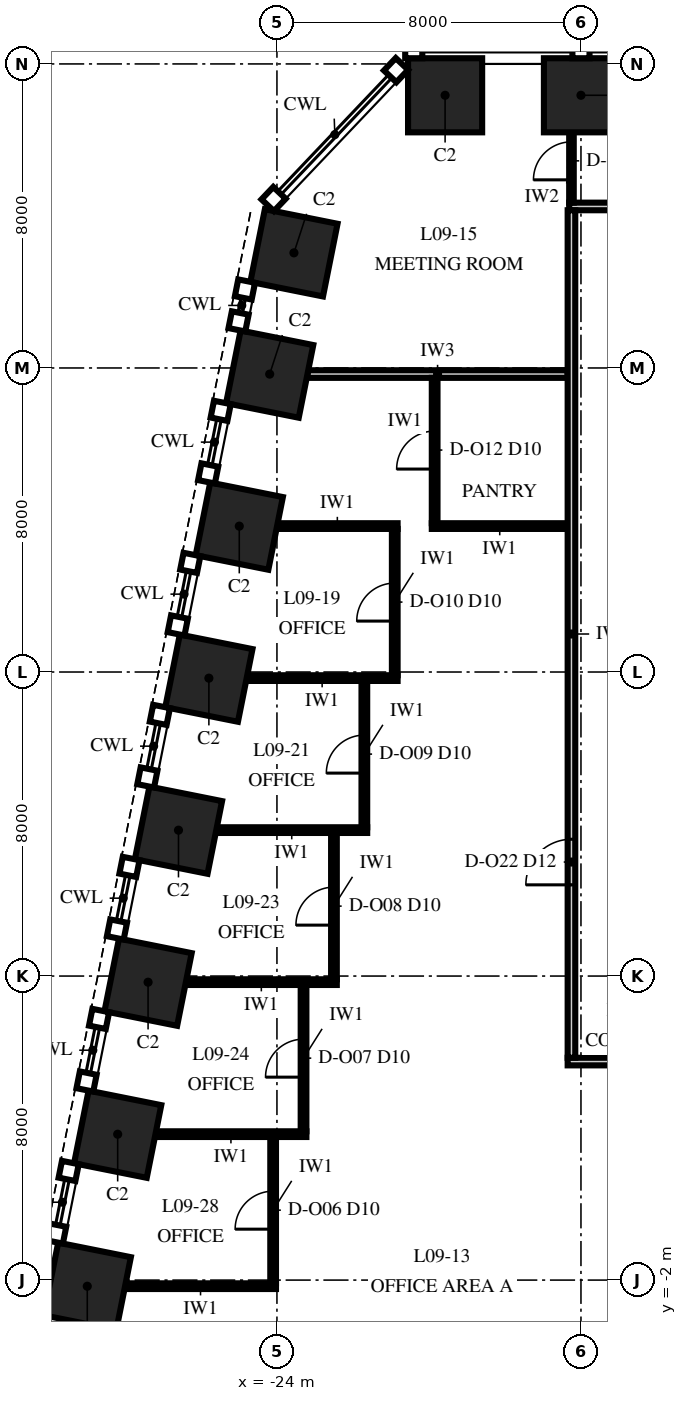
"""IFC4 building model, lengths in metres.
Left out: names, types, materials, properties, quantities, classifications, styles, units other than length and angle.
Written with IfcOpenShell. Run it as: python <this file> out.ifc"""

import sys

from ifc_helpers import new_model, si_unit, direction, frame, frame_2d, origin, origin_2d, place, context, subcontext, project, spatial, rectangle, extrude, element, fill, save


model = new_model("IFC4")
c1 = context("Model", 3, precision=1e-05, world=origin(), true_north=direction((0.0, 1.0)))
c2 = subcontext(c1, "Body", "Model", "MODEL_VIEW")
j1 = project(units=[si_unit("LENGTHUNIT", "METRE"), si_unit("PLANEANGLEUNIT", "RADIAN")], contexts=[c1])
p1 = place(None, origin())
s1 = spatial("IfcSite", under=j1, at=p1, CompositionType="ELEMENT")
p2 = place(p1, origin())
s2 = spatial("IfcBuilding", under=s1, at=p2, CompositionType="ELEMENT")
p3 = place(p2, frame((0.0, 0.0, 48.0)))
s3 = spatial("IfcBuildingStorey", under=s2, at=p3, CompositionType="ELEMENT", Elevation=48.0)
for number, where, z_axis, x_axis in (
    (1, (-16.0, 29.175, 0.0), (0.0, 0.0, 1.0), (-1.0, 0.0, 0.0)),
    (2, (-19.575, 29.175, 0.0), (0.0, 0.0, 1.0), (-1.0, 0.0, 0.0)),
    (3, (-23.553, 25.029, 0.0), (0.0, 0.0, 1.0), (-0.196, -0.981, 0.0)),
    (4, (-24.191, 21.838, 0.0), (0.0, 0.0, 1.0), (-0.196, -0.981, 0.0)),
    (5, (-24.991, 17.838, 0.0), (0.0, 0.0, 1.0), (-0.196, -0.981, 0.0)),
    (6, (-25.791, 13.838, 0.0), (0.0, 0.0, 1.0), (-0.196, -0.981, 0.0)),
    (7, (-26.591, 9.838, 0.0), (0.0, 0.0, 1.0), (-0.196, -0.981, 0.0)),
    (8, (-27.391, 5.838, 0.0), (0.0, 0.0, 1.0), (-0.196, -0.981, 0.0)),
    (9, (-28.191, 1.838, 0.0), (0.0, 0.0, 1.0), (-0.196, -0.981, 0.0)),
    (10, (-28.991, -2.162, 0.0), (0.0, 0.0, 1.0), (-0.196, -0.981, 0.0)),
):
    element("IfcColumn", number, at=place(p3, frame(where, z_axis=z_axis, x_axis=x_axis)), inside=s3, PredefinedType="COLUMN", context=c2, shape_type="SweptSolid", body=[
        extrude(rectangle(XDim=1.95, YDim=1.95, at=origin_2d()), origin(), (0.0, 0.0, 1.0), 4.0),
    ])
p4 = place(p3, frame((-27.996, -2.16, 0.0), z_axis=(0.0, 0.0, 1.0), x_axis=(1.0, 0.0, 0.0)))
e11 = element("IfcWall", 11, at=p4, inside=s3, PredefinedType="PARTITIONING", context=c2, shape_type="SweptSolid", body=[
    extrude(rectangle(XDim=3.971, YDim=0.15, at=frame_2d((1.986, 0.0))), origin(), (0.0, 0.0, 1.0), 3.25),
])
p5 = place(p3, frame((-27.196, 1.84, 0.0), z_axis=(0.0, 0.0, 1.0), x_axis=(1.0, 0.0, 0.0)))
e12 = element("IfcWall", 12, at=p5, inside=s3, PredefinedType="PARTITIONING", context=c2, shape_type="SweptSolid", body=[
    extrude(rectangle(XDim=3.971, YDim=0.15, at=frame_2d((1.986, 0.0))), origin(), (0.0, 0.0, 1.0), 3.25),
])
p6 = place(p3, frame((-16.35, 3.75, 0.0), z_axis=(0.0, 0.0, 1.0), x_axis=(1.0, 0.0, 0.0)))
e13 = element("IfcWall", 13, at=p6, inside=s3, PredefinedType="PARTITIONING", context=c2, shape_type="SweptSolid", body=[
    extrude(rectangle(XDim=32.7, YDim=0.2, at=frame_2d((16.35, 0.0))), origin(), (0.0, 0.0, 1.0), 3.25),
])
p7 = place(p6, frame((15.75, 0.0, 0.0)))
e14 = element("IfcOpeningElement", 14, at=p7, cuts=e13, PredefinedType="OPENING", context=c2, shape_type="SweptSolid", body=[
    extrude(rectangle(XDim=1.2, YDim=2.4, at=frame_2d((0.6, 1.2))), frame((0.0, 0.115, 0.0), z_axis=(0.0, -1.0, 0.0), x_axis=(1.0, 0.0, 0.0)), (0.0, 0.0, 1.0), 0.23),
])
p8 = place(p3, frame((-26.396, 5.84, 0.0), z_axis=(0.0, 0.0, 1.0), x_axis=(1.0, 0.0, 0.0)))
e15 = element("IfcWall", 15, at=p8, inside=s3, PredefinedType="PARTITIONING", context=c2, shape_type="SweptSolid", body=[
    extrude(rectangle(XDim=3.971, YDim=0.15, at=frame_2d((1.986, 0.0))), origin(), (0.0, 0.0, 1.0), 2.842),
])
for number, where, z_axis, x_axis in (
    (16, (-25.596, 9.84, 0.0), (0.0, 0.0, 1.0), (1.0, 0.0, 0.0)),
    (17, (-24.796, 13.84, 0.0), (0.0, 0.0, 1.0), (1.0, 0.0, 0.0)),
):
    element("IfcWall", number, at=place(p3, frame(where, z_axis=z_axis, x_axis=x_axis)), inside=s3, PredefinedType="PARTITIONING", context=c2, shape_type="SweptSolid", body=[
        extrude(rectangle(XDim=3.971, YDim=0.15, at=frame_2d((1.986, 0.0))), origin(), (0.0, 0.0, 1.0), 3.25),
    ])
p9 = place(p3, frame((-23.996, 17.84, 0.0), z_axis=(0.0, 0.0, 1.0), x_axis=(1.0, 0.0, 0.0)))
e18 = element("IfcWall", 18, at=p9, inside=s3, PredefinedType="PARTITIONING", context=c2, shape_type="SweptSolid", body=[
    extrude(rectangle(XDim=3.171, YDim=0.15, at=frame_2d((1.586, 0.0))), origin(), (0.0, 0.0, 1.0), 3.25),
])
p10 = place(p3, frame((-19.925, 17.84, 0.0), z_axis=(0.0, 0.0, 1.0), x_axis=(1.0, 0.0, 0.0)))
e19 = element("IfcWall", 19, at=p10, inside=s3, PredefinedType="PARTITIONING", context=c2, shape_type="SweptSolid", body=[
    extrude(rectangle(XDim=3.575, YDim=0.15, at=frame_2d((1.788, 0.0))), origin(), (0.0, 0.0, 1.0), 3.25),
])
p11 = place(p3, frame((-23.196, 21.84, 0.0), z_axis=(0.0, 0.0, 1.0), x_axis=(1.0, 0.0, 0.0)))
e20 = element("IfcWall", 20, at=p11, inside=s3, PredefinedType="PARTITIONING", context=c2, shape_type="SweptSolid", body=[
    extrude(rectangle(XDim=6.846, YDim=0.2, at=frame_2d((3.423, 0.0))), origin(), (0.0, 0.0, 1.0), 3.25),
])
p12 = place(p3, frame((-16.31, 26.25, 0.0), z_axis=(0.0, 0.0, 1.0), x_axis=(1.0, 0.0, 0.0)))
e21 = element("IfcWall", 21, at=p12, inside=s3, PredefinedType="PARTITIONING", context=c2, shape_type="SweptSolid", body=[
    extrude(rectangle(XDim=32.635, YDim=0.2, at=frame_2d((16.317, 0.0))), origin(), (0.0, 0.0, 1.0), 3.4),
])
p13 = place(p12, frame((15.71, 0.0, 0.0)))
e22 = element("IfcOpeningElement", 22, at=p13, cuts=e21, PredefinedType="OPENING", context=c2, shape_type="SweptSolid", body=[
    extrude(rectangle(XDim=1.2, YDim=2.4, at=frame_2d((0.6, 1.2))), frame((0.0, 0.115, 0.0), z_axis=(0.0, -1.0, 0.0), x_axis=(1.0, 0.0, 0.0)), (0.0, 0.0, 1.0), 0.23),
])
p14 = place(p3, frame((-24.1, -2.085, 0.0), z_axis=(0.0, 0.0, 1.0), x_axis=(0.0, 1.0, 0.0)))
e23 = element("IfcWall", 23, at=p14, inside=s3, PredefinedType="PARTITIONING", context=c2, shape_type="SweptSolid", body=[
    extrude(rectangle(XDim=3.85, YDim=0.15, at=frame_2d((1.925, 0.0))), origin(), (0.0, 0.0, 1.0), 3.85),
])
p15 = place(p14, frame((1.425, 0.0, 0.0)))
e24 = element("IfcOpeningElement", 24, at=p15, cuts=e23, PredefinedType="OPENING", context=c2, shape_type="SweptSolid", body=[
    extrude(rectangle(XDim=1.0, YDim=2.3, at=frame_2d((0.5, 1.15))), frame((0.0, 0.09, 0.0), z_axis=(0.0, -1.0, 0.0), x_axis=(1.0, 0.0, 0.0)), (0.0, 0.0, 1.0), 0.18),
])
p16 = place(p3, frame((-23.3, 1.915, 0.0), z_axis=(0.0, 0.0, 1.0), x_axis=(0.0, 1.0, 0.0)))
e25 = element("IfcWall", 25, at=p16, inside=s3, PredefinedType="PARTITIONING", context=c2, shape_type="SweptSolid", body=[
    extrude(rectangle(XDim=3.85, YDim=0.15, at=frame_2d((1.925, 0.0))), origin(), (0.0, 0.0, 1.0), 3.85),
])
p17 = place(p16, frame((1.425, 0.0, 0.0)))
e26 = element("IfcOpeningElement", 26, at=p17, cuts=e25, PredefinedType="OPENING", context=c2, shape_type="SweptSolid", body=[
    extrude(rectangle(XDim=1.0, YDim=2.3, at=frame_2d((0.5, 1.15))), frame((0.0, 0.09, 0.0), z_axis=(0.0, -1.0, 0.0), x_axis=(1.0, 0.0, 0.0)), (0.0, 0.0, 1.0), 0.18),
])
p18 = place(p3, frame((-22.5, 5.915, 0.0), z_axis=(0.0, 0.0, 1.0), x_axis=(0.0, 1.0, 0.0)))
e27 = element("IfcWall", 27, at=p18, inside=s3, PredefinedType="PARTITIONING", context=c2, shape_type="SweptSolid", body=[
    extrude(rectangle(XDim=3.85, YDim=0.15, at=frame_2d((1.925, 0.0))), origin(), (0.0, 0.0, 1.0), 2.842),
])
p19 = place(p18, frame((1.425, 0.0, 0.0)))
e28 = element("IfcOpeningElement", 28, at=p19, cuts=e27, PredefinedType="OPENING", context=c2, shape_type="SweptSolid", body=[
    extrude(rectangle(XDim=1.0, YDim=2.3, at=frame_2d((0.5, 1.15))), frame((0.0, 0.09, 0.0), z_axis=(0.0, -1.0, 0.0), x_axis=(1.0, 0.0, 0.0)), (0.0, 0.0, 1.0), 0.18),
])
p20 = place(p3, frame((-21.7, 9.915, 0.0), z_axis=(0.0, 0.0, 1.0), x_axis=(0.0, 1.0, 0.0)))
e29 = element("IfcWall", 29, at=p20, inside=s3, PredefinedType="PARTITIONING", context=c2, shape_type="SweptSolid", body=[
    extrude(rectangle(XDim=3.85, YDim=0.15, at=frame_2d((1.925, 0.0))), origin(), (0.0, 0.0, 1.0), 3.85),
])
p21 = place(p20, frame((1.425, 0.0, 0.0)))
e30 = element("IfcOpeningElement", 30, at=p21, cuts=e29, PredefinedType="OPENING", context=c2, shape_type="SweptSolid", body=[
    extrude(rectangle(XDim=1.0, YDim=2.3, at=frame_2d((0.5, 1.15))), frame((0.0, 0.09, 0.0), z_axis=(0.0, -1.0, 0.0), x_axis=(1.0, 0.0, 0.0)), (0.0, 0.0, 1.0), 0.18),
])
p22 = place(p3, frame((-20.9, 13.915, 0.0), z_axis=(0.0, 0.0, 1.0), x_axis=(0.0, 1.0, 0.0)))
e31 = element("IfcWall", 31, at=p22, inside=s3, PredefinedType="PARTITIONING", context=c2, shape_type="SweptSolid", body=[
    extrude(rectangle(XDim=3.85, YDim=0.15, at=frame_2d((1.925, 0.0))), origin(), (0.0, 0.0, 1.0), 3.25),
])
p23 = place(p22, frame((1.425, 0.0, 0.0)))
e32 = element("IfcOpeningElement", 32, at=p23, cuts=e31, PredefinedType="OPENING", context=c2, shape_type="SweptSolid", body=[
    extrude(rectangle(XDim=1.0, YDim=2.3, at=frame_2d((0.5, 1.15))), frame((0.0, 0.09, 0.0), z_axis=(0.0, -1.0, 0.0), x_axis=(1.0, 0.0, 0.0)), (0.0, 0.0, 1.0), 0.18),
])
p24 = place(p3, frame((-19.85, 17.915, 0.0), z_axis=(0.0, 0.0, 1.0), x_axis=(0.0, 1.0, 0.0)))
e33 = element("IfcWall", 33, at=p24, inside=s3, PredefinedType="PARTITIONING", context=c2, shape_type="SweptSolid", body=[
    extrude(rectangle(XDim=3.825, YDim=0.15, at=frame_2d((1.913, 0.0))), origin(), (0.0, 0.0, 1.0), 3.25),
])
p25 = place(p24, frame((1.425, 0.0, 0.0)))
e34 = element("IfcOpeningElement", 34, at=p25, cuts=e33, PredefinedType="OPENING", context=c2, shape_type="SweptSolid", body=[
    extrude(rectangle(XDim=1.0, YDim=2.3, at=frame_2d((0.5, 1.15))), frame((0.0, 0.09, 0.0), z_axis=(0.0, -1.0, 0.0), x_axis=(1.0, 0.0, 0.0)), (0.0, 0.0, 1.0), 0.18),
])
p26 = place(p3, frame((-16.25, 3.85, 0.0), z_axis=(0.0, 0.0, 1.0), x_axis=(0.0, 1.0, 0.0)))
e35 = element("IfcWall", 35, at=p26, inside=s3, PredefinedType="PARTITIONING", context=c2, shape_type="SweptSolid", body=[
    extrude(rectangle(XDim=22.3, YDim=0.2, at=frame_2d((11.15, 0.0))), origin(), (0.0, 0.0, 1.0), 2.842),
])
p27 = place(p26, frame((4.55, 0.0, 0.0)))
e36 = element("IfcOpeningElement", 36, at=p27, cuts=e35, PredefinedType="OPENING", context=c2, shape_type="SweptSolid", body=[
    extrude(rectangle(XDim=1.2, YDim=2.4, at=frame_2d((0.6, 1.2))), frame((0.0, 0.115, 0.0), z_axis=(0.0, -1.0, 0.0), x_axis=(1.0, 0.0, 0.0)), (0.0, 0.0, 1.0), 0.23),
])
p28 = place(p3, frame((-16.25, 26.35, 0.0), z_axis=(0.0, 0.0, 1.0), x_axis=(0.0, 1.0, 0.0)))
e37 = element("IfcWall", 37, at=p28, inside=s3, PredefinedType="PARTITIONING", context=c2, shape_type="SweptSolid", body=[
    extrude(rectangle(XDim=1.85, YDim=0.12, at=frame_2d((0.925, 0.0))), origin(), (0.0, 0.0, 1.0), 3.85),
])
p29 = place(p28, frame((0.6, 0.0, 0.0)))
e38 = element("IfcOpeningElement", 38, at=p29, cuts=e37, PredefinedType="OPENING", context=c2, shape_type="SweptSolid", body=[
    extrude(rectangle(XDim=1.0, YDim=2.4, at=frame_2d((0.5, 1.2))), frame((0.0, 0.075, 0.0), z_axis=(0.0, -1.0, 0.0), x_axis=(1.0, 0.0, 0.0)), (0.0, 0.0, 1.0), 0.15),
])
p30 = place(p15, origin())
e39 = element("IfcDoor", 39, at=p30, inside=s3, OperationType="SINGLE_SWING_LEFT", PredefinedType="DOOR", context=c2, shape_type="SweptSolid", body=[
    extrude(rectangle(XDim=1.0, YDim=2.3, at=frame_2d((0.5, 1.15))), frame((0.0, 0.075, 0.0), z_axis=(0.0, -1.0, 0.0), x_axis=(1.0, 0.0, 0.0)), (0.0, 0.0, 1.0), 0.149),
])
fill(e24, e39)
p31 = place(p17, origin())
e40 = element("IfcDoor", 40, at=p31, inside=s3, OperationType="SINGLE_SWING_LEFT", PredefinedType="DOOR", context=c2, shape_type="SweptSolid", body=[
    extrude(rectangle(XDim=1.0, YDim=2.3, at=frame_2d((0.5, 1.15))), frame((0.0, 0.075, 0.0), z_axis=(0.0, -1.0, 0.0), x_axis=(1.0, 0.0, 0.0)), (0.0, 0.0, 1.0), 0.149),
])
fill(e26, e40)
p32 = place(p19, origin())
e41 = element("IfcDoor", 41, at=p32, inside=s3, OperationType="SINGLE_SWING_LEFT", PredefinedType="DOOR", context=c2, shape_type="SweptSolid", body=[
    extrude(rectangle(XDim=1.0, YDim=2.3, at=frame_2d((0.5, 1.15))), frame((0.0, 0.075, 0.0), z_axis=(0.0, -1.0, 0.0), x_axis=(1.0, 0.0, 0.0)), (0.0, 0.0, 1.0), 0.149),
])
fill(e28, e41)
p33 = place(p21, origin())
e42 = element("IfcDoor", 42, at=p33, inside=s3, OperationType="SINGLE_SWING_LEFT", PredefinedType="DOOR", context=c2, shape_type="SweptSolid", body=[
    extrude(rectangle(XDim=1.0, YDim=2.3, at=frame_2d((0.5, 1.15))), frame((0.0, 0.075, 0.0), z_axis=(0.0, -1.0, 0.0), x_axis=(1.0, 0.0, 0.0)), (0.0, 0.0, 1.0), 0.149),
])
fill(e30, e42)
p34 = place(p23, origin())
e43 = element("IfcDoor", 43, at=p34, inside=s3, OperationType="SINGLE_SWING_LEFT", PredefinedType="DOOR", context=c2, shape_type="SweptSolid", body=[
    extrude(rectangle(XDim=1.0, YDim=2.3, at=frame_2d((0.5, 1.15))), frame((0.0, 0.075, 0.0), z_axis=(0.0, -1.0, 0.0), x_axis=(1.0, 0.0, 0.0)), (0.0, 0.0, 1.0), 0.149),
])
fill(e32, e43)
p35 = place(p25, origin())
e44 = element("IfcDoor", 44, at=p35, inside=s3, OperationType="SINGLE_SWING_LEFT", PredefinedType="DOOR", context=c2, shape_type="SweptSolid", body=[
    extrude(rectangle(XDim=1.0, YDim=2.3, at=frame_2d((0.5, 1.15))), frame((0.0, 0.075, 0.0), z_axis=(0.0, -1.0, 0.0), x_axis=(1.0, 0.0, 0.0)), (0.0, 0.0, 1.0), 0.149),
])
fill(e34, e44)
p36 = place(p29, origin())
e45 = element("IfcDoor", 45, at=p36, inside=s3, OperationType="SINGLE_SWING_RIGHT", PredefinedType="DOOR", context=c2, shape_type="SweptSolid", body=[
    extrude(rectangle(XDim=1.0, YDim=2.4, at=frame_2d((0.5, 1.2))), frame((0.0, 0.06, 0.0), z_axis=(0.0, -1.0, 0.0), x_axis=(1.0, 0.0, 0.0)), (0.0, 0.0, 1.0), 0.12),
])
fill(e38, e45)
p37 = place(p27, origin())
e46 = element("IfcDoor", 46, at=p37, inside=s3, OperationType="SINGLE_SWING_LEFT", PredefinedType="DOOR", context=c2, shape_type="SweptSolid", body=[
    extrude(rectangle(XDim=1.2, YDim=2.4, at=frame_2d((0.6, 1.2))), frame((0.0, 0.1, 0.0), z_axis=(0.0, -1.0, 0.0), x_axis=(1.0, 0.0, 0.0)), (0.0, 0.0, 1.0), 0.199),
])
fill(e36, e46)
save(model, sys.argv[1])
